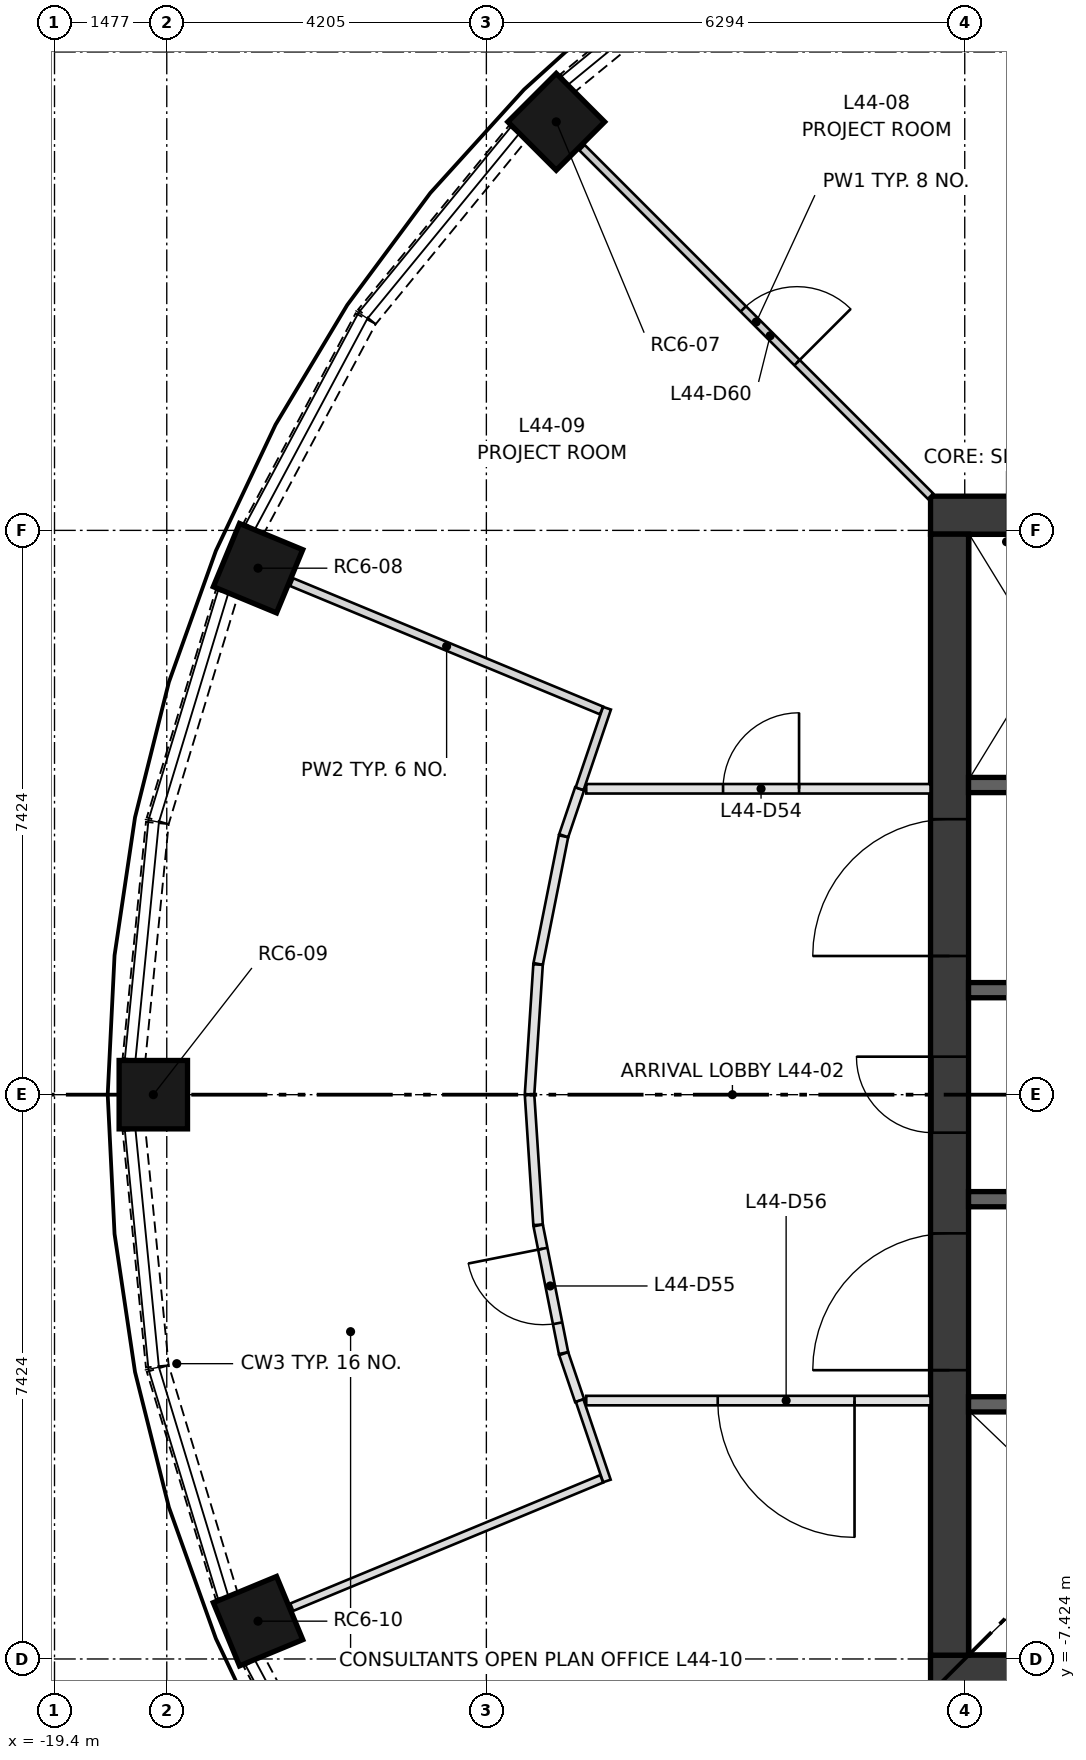
"""IFC4 building model, lengths in metres.
Left out: names, types, materials, properties, quantities, classifications, styles, units other than length and angle.
Written with IfcOpenShell. Run it as: python <this file> out.ifc"""

import sys

from ifc_helpers import new_model, si_unit, direction, frame, frame_2d, origin, origin_2d, place, context, subcontext, project, spatial, rectangle, extrude, element, fill, save


model = new_model("IFC4")
c1 = context("Model", 3, precision=1e-05, world=origin(), true_north=direction((0.0, 1.0)))
c2 = subcontext(c1, "Body", "Model", "MODEL_VIEW")
j1 = project(units=[si_unit("LENGTHUNIT", "METRE"), si_unit("PLANEANGLEUNIT", "RADIAN")], contexts=[c1])
p1 = place(None, origin())
s1 = spatial("IfcSite", under=j1, at=p1, CompositionType="ELEMENT")
p2 = place(p1, origin())
s2 = spatial("IfcBuilding", under=s1, at=p2, CompositionType="ELEMENT")
p3 = place(p2, frame((0.0, 0.0, 167.55)))
s3 = spatial("IfcBuildingStorey", under=s2, at=p3, CompositionType="ELEMENT", Elevation=167.55)
for number, where, z_axis, x_axis in (
    (1, (-12.799, 12.799, 0.0), (0.0, 0.0, 1.0), (-0.707, 0.707, 0.0)),
    (2, (-16.722, 6.927, 0.0), (0.0, 0.0, 1.0), (-0.924, 0.383, 0.0)),
    (3, (-18.1, 0.0, 0.0), (0.0, 0.0, 1.0), (-1.0, 0.0, 0.0)),
    (4, (-16.722, -6.927, 0.0), (0.0, 0.0, 1.0), (-0.924, -0.383, 0.0)),
):
    element("IfcColumn", number, at=place(p3, frame(where, z_axis=z_axis, x_axis=x_axis)), inside=s3, PredefinedType="COLUMN", context=c2, shape_type="SweptSolid", body=[
        extrude(rectangle(XDim=0.9, YDim=0.9, at=origin_2d()), origin(), (0.0, 0.0, 1.0), 3.35),
    ])
for number, where, z_axis, x_axis in (
    (5, (-7.874, -7.624, 0.0), (0.0, 0.0, 1.0), (1.0, 0.0, 0.0)),
    (6, (-7.874, 7.624, 0.0), (0.0, 0.0, 1.0), (1.0, 0.0, 0.0)),
):
    element("IfcWall", number, at=place(p3, frame(where, z_axis=z_axis, x_axis=x_axis)), inside=s3, PredefinedType="SHEAR", context=c2, shape_type="SweptSolid", body=[
        extrude(rectangle(XDim=15.748, YDim=0.5, at=frame_2d((7.874, 0.0))), origin(), (0.0, 0.0, 1.0), 3.35),
    ])
p4 = place(p3, frame((-7.624, -7.374, 0.0), z_axis=(0.0, 0.0, 1.0), x_axis=(0.0, 1.0, 0.0)))
e7 = element("IfcWall", 7, at=p4, inside=s3, PredefinedType="SHEAR", context=c2, shape_type="SweptSolid", body=[
    extrude(rectangle(XDim=14.748, YDim=0.5, at=frame_2d((7.374, 0.0))), origin(), (0.0, 0.0, 1.0), 3.35),
])
p5 = place(p4, frame((6.874, 0.0, 0.0)))
e8 = element("IfcOpeningElement", 8, at=p5, cuts=e7, PredefinedType="OPENING", context=c2, shape_type="SweptSolid", body=[
    extrude(rectangle(XDim=1.0, YDim=2.1, at=frame_2d((0.5, 1.05))), frame((0.0, 0.26, 0.0), z_axis=(0.0, -1.0, 0.0), x_axis=(1.0, 0.0, 0.0)), (0.0, 0.0, 1.0), 0.52),
])
p6 = place(p4, frame((3.75, 0.0, 0.0)))
e9 = element("IfcOpeningElement", 9, at=p6, cuts=e7, PredefinedType="OPENING", context=c2, shape_type="SweptSolid", body=[
    extrude(rectangle(XDim=1.8, YDim=2.1, at=frame_2d((0.9, 1.05))), frame((0.0, 0.26, 0.0), z_axis=(0.0, -1.0, 0.0), x_axis=(1.0, 0.0, 0.0)), (0.0, 0.0, 1.0), 0.52),
])
p7 = place(p4, frame((9.198, 0.0, 0.0)))
e10 = element("IfcOpeningElement", 10, at=p7, cuts=e7, PredefinedType="OPENING", context=c2, shape_type="SweptSolid", body=[
    extrude(rectangle(XDim=1.8, YDim=2.1, at=frame_2d((0.9, 1.05))), frame((0.0, 0.26, 0.0), z_axis=(0.0, -1.0, 0.0), x_axis=(1.0, 0.0, 0.0)), (0.0, 0.0, 1.0), 0.52),
])
p8 = place(p3, frame((-7.374, -4.074, 0.0), z_axis=(0.0, 0.0, 1.0), x_axis=(1.0, 0.0, 0.0)))
e11 = element("IfcWall", 11, at=p8, inside=s3, PredefinedType="SHEAR", context=c2, shape_type="SweptSolid", body=[
    extrude(rectangle(XDim=14.748, YDim=0.2, at=frame_2d((7.374, 0.0))), origin(), (0.0, 0.0, 1.0), 3.0),
])
p9 = place(p8, frame((1.319, 0.0, 0.0)))
e12 = element("IfcOpeningElement", 12, at=p9, cuts=e11, PredefinedType="OPENING", context=c2, shape_type="SweptSolid", body=[
    extrude(rectangle(XDim=1.1, YDim=2.1, at=frame_2d((0.55, 1.05))), frame((0.0, 0.11, 0.0), z_axis=(0.0, -1.0, 0.0), x_axis=(1.0, 0.0, 0.0)), (0.0, 0.0, 1.0), 0.22),
])
p10 = place(p8, frame((4.456, 0.0, 0.0)))
e13 = element("IfcOpeningElement", 13, at=p10, cuts=e11, PredefinedType="OPENING", context=c2, shape_type="SweptSolid", body=[
    extrude(rectangle(XDim=1.1, YDim=2.1, at=frame_2d((0.55, 1.05))), frame((0.0, 0.11, 0.0), z_axis=(0.0, -1.0, 0.0), x_axis=(1.0, 0.0, 0.0)), (0.0, 0.0, 1.0), 0.22),
])
p11 = place(p8, frame((7.551, 0.0, 0.0)))
e14 = element("IfcOpeningElement", 14, at=p11, cuts=e11, PredefinedType="OPENING", context=c2, shape_type="SweptSolid", body=[
    extrude(rectangle(XDim=1.0, YDim=2.1, at=frame_2d((0.5, 1.05))), frame((0.0, 0.11, 0.0), z_axis=(0.0, -1.0, 0.0), x_axis=(1.0, 0.0, 0.0)), (0.0, 0.0, 1.0), 0.22),
])
p12 = place(p8, frame((9.914, 0.0, 0.0)))
e15 = element("IfcOpeningElement", 15, at=p12, cuts=e11, PredefinedType="OPENING", context=c2, shape_type="SweptSolid", body=[
    extrude(rectangle(XDim=1.0, YDim=2.1, at=frame_2d((0.5, 1.05))), frame((0.0, 0.11, 0.0), z_axis=(0.0, -1.0, 0.0), x_axis=(1.0, 0.0, 0.0)), (0.0, 0.0, 1.0), 0.22),
])
p13 = place(p8, frame((11.688, 0.0, 0.0)))
e16 = element("IfcOpeningElement", 16, at=p13, cuts=e11, PredefinedType="OPENING", context=c2, shape_type="SweptSolid", body=[
    extrude(rectangle(XDim=1.0, YDim=2.1, at=frame_2d((0.5, 1.05))), frame((0.0, 0.11, 0.0), z_axis=(0.0, -1.0, 0.0), x_axis=(1.0, 0.0, 0.0)), (0.0, 0.0, 1.0), 0.22),
])
p14 = place(p8, frame((13.461, 0.0, 0.0)))
e17 = element("IfcOpeningElement", 17, at=p14, cuts=e11, PredefinedType="OPENING", context=c2, shape_type="SweptSolid", body=[
    extrude(rectangle(XDim=1.0, YDim=2.1, at=frame_2d((0.5, 1.05))), frame((0.0, 0.11, 0.0), z_axis=(0.0, -1.0, 0.0), x_axis=(1.0, 0.0, 0.0)), (0.0, 0.0, 1.0), 0.22),
])
p15 = place(p3, frame((-7.374, 4.074, 0.0), z_axis=(0.0, 0.0, 1.0), x_axis=(1.0, 0.0, 0.0)))
e18 = element("IfcWall", 18, at=p15, inside=s3, PredefinedType="SHEAR", context=c2, shape_type="SweptSolid", body=[
    extrude(rectangle(XDim=7.374, YDim=0.2, at=frame_2d((3.687, 0.0))), origin(), (0.0, 0.0, 1.0), 3.0),
])
p16 = place(p15, frame((0.684, 0.0, 0.0)))
e19 = element("IfcOpeningElement", 19, at=p16, cuts=e18, PredefinedType="OPENING", context=c2, shape_type="SweptSolid", body=[
    extrude(rectangle(XDim=1.0, YDim=2.1, at=frame_2d((0.5, 1.05))), frame((0.0, 0.11, 0.0), z_axis=(0.0, -1.0, 0.0), x_axis=(1.0, 0.0, 0.0)), (0.0, 0.0, 1.0), 0.22),
])
p17 = place(p15, frame((2.453, 0.0, 0.0)))
e20 = element("IfcOpeningElement", 20, at=p17, cuts=e18, PredefinedType="OPENING", context=c2, shape_type="SweptSolid", body=[
    extrude(rectangle(XDim=1.0, YDim=2.1, at=frame_2d((0.5, 1.05))), frame((0.0, 0.11, 0.0), z_axis=(0.0, -1.0, 0.0), x_axis=(1.0, 0.0, 0.0)), (0.0, 0.0, 1.0), 0.22),
])
p18 = place(p15, frame((4.221, 0.0, 0.0)))
e21 = element("IfcOpeningElement", 21, at=p18, cuts=e18, PredefinedType="OPENING", context=c2, shape_type="SweptSolid", body=[
    extrude(rectangle(XDim=1.0, YDim=2.1, at=frame_2d((0.5, 1.05))), frame((0.0, 0.11, 0.0), z_axis=(0.0, -1.0, 0.0), x_axis=(1.0, 0.0, 0.0)), (0.0, 0.0, 1.0), 0.22),
])
p19 = place(p15, frame((5.99, 0.0, 0.0)))
e22 = element("IfcOpeningElement", 22, at=p19, cuts=e18, PredefinedType="OPENING", context=c2, shape_type="SweptSolid", body=[
    extrude(rectangle(XDim=1.0, YDim=2.1, at=frame_2d((0.5, 1.05))), frame((0.0, 0.11, 0.0), z_axis=(0.0, -1.0, 0.0), x_axis=(1.0, 0.0, 0.0)), (0.0, 0.0, 1.0), 0.22),
])
for number, where, z_axis, x_axis in (
    (23, (-7.374, -1.375, 0.0), (0.0, 0.0, 1.0), (1.0, 0.0, 0.0)),
    (24, (-7.374, 1.375, 0.0), (0.0, 0.0, 1.0), (1.0, 0.0, 0.0)),
):
    element("IfcWall", number, at=place(p3, frame(where, z_axis=z_axis, x_axis=x_axis)), inside=s3, PredefinedType="SHEAR", context=c2, shape_type="SweptSolid", body=[
        extrude(rectangle(XDim=3.0, YDim=0.2, at=frame_2d((1.5, 0.0))), origin(), (0.0, 0.0, 1.0), 3.0),
    ])
for number, where, z_axis, x_axis in (
    (25, (-10.234, 15.29, 0.0), (0.0, 0.0, 1.0), (-0.773, -0.634, 0.0)),
    (26, (-13.306, 12.651, 0.0), (0.0, 0.0, 1.0), (-0.634, -0.773, 0.0)),
):
    element("IfcWall", number, at=place(p3, frame(where, z_axis=z_axis, x_axis=x_axis)), inside=s3, PredefinedType="SOLIDWALL", context=c2, shape_type="SweptSolid", body=[
        extrude(rectangle(XDim=3.127, YDim=0.3, at=frame_2d((1.563, 0.0))), origin(), (0.0, 0.0, 1.0), 0.9),
    ])
p20 = place(p3, frame((-15.306, 10.209, 0.0), z_axis=(0.0, 0.0, 1.0), x_axis=(-0.47120441036, -0.882024038027, 0.0)))
e27 = element("IfcWall", 27, at=p20, inside=s3, PredefinedType="SOLIDWALL", context=c2, shape_type="SweptSolid", body=[
    extrude(rectangle(XDim=3.125, YDim=0.3, at=frame_2d((1.562, 0.0))), origin(), (0.0, 0.0, 1.0), 0.9),
])
p21 = place(p3, frame((-17.135, 6.596, 0.0), z_axis=(0.0, 0.0, 1.0), x_axis=(-0.290083245834, -0.957001416136, 0.0)))
e28 = element("IfcWall", 28, at=p21, inside=s3, PredefinedType="SOLIDWALL", context=c2, shape_type="SweptSolid", body=[
    extrude(rectangle(XDim=3.127, YDim=0.3, at=frame_2d((1.563, 0.0))), origin(), (0.0, 0.0, 1.0), 0.9),
])
for number, where, z_axis, x_axis in (
    (29, (-18.048, 3.574, 0.0), (0.0, 0.0, 1.0), (-0.098, -0.995, 0.0)),
    (30, (-18.354, -0.464, 0.0), (0.0, 0.0, 1.0), (0.098, -0.995, 0.0)),
):
    element("IfcWall", number, at=place(p3, frame(where, z_axis=z_axis, x_axis=x_axis)), inside=s3, PredefinedType="SOLIDWALL", context=c2, shape_type="SweptSolid", body=[
        extrude(rectangle(XDim=3.125, YDim=0.3, at=frame_2d((1.563, 0.0))), origin(), (0.0, 0.0, 1.0), 0.9),
    ])
p22 = place(p3, frame((-18.042, -3.604, 0.0), z_axis=(0.0, 0.0, 1.0), x_axis=(0.290083245834, -0.957001416136, 0.0)))
e31 = element("IfcWall", 31, at=p22, inside=s3, PredefinedType="SOLIDWALL", context=c2, shape_type="SweptSolid", body=[
    extrude(rectangle(XDim=3.127, YDim=0.3, at=frame_2d((1.563, 0.0))), origin(), (0.0, 0.0, 1.0), 0.9),
])
p23 = place(p3, frame((-16.779, -7.452, 0.0), z_axis=(0.0, 0.0, 1.0), x_axis=(0.47120441036, -0.882024038027, 0.0)))
e32 = element("IfcWall", 32, at=p23, inside=s3, PredefinedType="SOLIDWALL", context=c2, shape_type="SweptSolid", body=[
    extrude(rectangle(XDim=3.125, YDim=0.3, at=frame_2d((1.562, 0.0))), origin(), (0.0, 0.0, 1.0), 0.9),
])
p24 = place(p3, frame((-12.404, 4.024, 0.0), z_axis=(0.0, 0.0, 1.0), x_axis=(1.0, 0.0, 0.0)))
e33 = element("IfcWall", 33, at=p24, inside=s3, PredefinedType="PARTITIONING", context=c2, shape_type="SweptSolid", body=[
    extrude(rectangle(XDim=4.53, YDim=0.125, at=frame_2d((2.265, 0.0))), origin(), (0.0, 0.0, 1.0), 3.0),
])
p25 = place(p24, frame((1.8, 0.0, 0.0)))
e34 = element("IfcOpeningElement", 34, at=p25, cuts=e33, PredefinedType="OPENING", context=c2, shape_type="SweptSolid", body=[
    extrude(rectangle(XDim=1.0, YDim=2.1, at=frame_2d((0.5, 1.05))), frame((0.0, 0.073, 0.0), z_axis=(0.0, -1.0, 0.0), x_axis=(1.0, 0.0, 0.0)), (0.0, 0.0, 1.0), 0.145),
])
for number, where, z_axis, x_axis in (
    (35, (-13.15, 0.004, 0.0), (0.0, 0.0, 1.0), (0.065, 0.998, 0.0)),
    (36, (-13.038, -1.712, 0.0), (0.0, 0.0, 1.0), (-0.065, 0.998, 0.0)),
    (37, (-13.037, 1.72, 0.0), (0.0, 0.0, 1.0), (0.195, 0.981, 0.0)),
):
    element("IfcWall", number, at=place(p3, frame(where, z_axis=z_axis, x_axis=x_axis)), inside=s3, PredefinedType="PARTITIONING", context=c2, shape_type="SweptSolid", body=[
        extrude(rectangle(XDim=1.712, YDim=0.125, at=frame_2d((0.856, 0.0))), origin(), (0.0, 0.0, 1.0), 3.0),
    ])
p26 = place(p3, frame((-12.703, -3.399, 0.0), z_axis=(0.0, 0.0, 1.0), x_axis=(-0.195101249107, 0.980783106806, 0.0)))
e38 = element("IfcWall", 38, at=p26, inside=s3, PredefinedType="PARTITIONING", context=c2, shape_type="SweptSolid", body=[
    extrude(rectangle(XDim=1.712, YDim=0.125, at=frame_2d((0.856, 0.0))), origin(), (0.0, 0.0, 1.0), 3.0),
])
p27 = place(p26, frame((0.4, 0.0, 0.0)))
e39 = element("IfcOpeningElement", 39, at=p27, cuts=e38, PredefinedType="OPENING", context=c2, shape_type="SweptSolid", body=[
    extrude(rectangle(XDim=1.0, YDim=2.1, at=frame_2d((0.5, 1.05))), frame((0.0, 0.073, 0.0), z_axis=(0.0, -1.0, 0.0), x_axis=(1.0, 0.0, 0.0)), (0.0, 0.0, 1.0), 0.145),
])
for number, where, z_axis, x_axis in (
    (40, (-12.701, 3.407, 0.0), (0.0, 0.0, 1.0), (0.322, 0.947, 0.0)),
    (41, (-12.491, -4.024, 0.0), (0.0, 0.0, 1.0), (-0.322, 0.947, 0.0)),
):
    element("IfcWall", number, at=place(p3, frame(where, z_axis=z_axis, x_axis=x_axis)), inside=s3, PredefinedType="PARTITIONING", context=c2, shape_type="SweptSolid", body=[
        extrude(rectangle(XDim=0.652, YDim=0.125, at=frame_2d((0.326, 0.0))), origin(), (0.0, 0.0, 1.0), 3.0),
    ])
p28 = place(p3, frame((-7.874, -4.024, 0.0), z_axis=(0.0, 0.0, 1.0), x_axis=(-1.0, 0.0, 0.0)))
e42 = element("IfcWall", 42, at=p28, inside=s3, PredefinedType="PARTITIONING", context=c2, shape_type="SweptSolid", body=[
    extrude(rectangle(XDim=4.53, YDim=0.125, at=frame_2d((2.265, 0.0))), origin(), (0.0, 0.0, 1.0), 3.0),
])
p29 = place(p28, frame((1.0, 0.0, 0.0)))
e43 = element("IfcOpeningElement", 43, at=p29, cuts=e42, PredefinedType="OPENING", context=c2, shape_type="SweptSolid", body=[
    extrude(rectangle(XDim=1.8, YDim=2.1, at=frame_2d((0.9, 1.05))), frame((0.0, 0.073, 0.0), z_axis=(0.0, -1.0, 0.0), x_axis=(1.0, 0.0, 0.0)), (0.0, 0.0, 1.0), 0.145),
])
p30 = place(p3, frame((-12.459, 12.459, 0.0), z_axis=(0.0, 0.0, 1.0), x_axis=(0.707106781187, -0.707106781187, 0.0)))
e44 = element("IfcWall", 44, at=p30, inside=s3, PredefinedType="PARTITIONING", context=c2, shape_type="SweptSolid", body=[
    extrude(rectangle(XDim=6.484, YDim=0.1, at=frame_2d((3.242, 0.0))), origin(), (0.0, 0.0, 1.0), 3.0),
])
p31 = place(p30, frame((3.0, 0.0, 0.0)))
e45 = element("IfcOpeningElement", 45, at=p31, cuts=e44, PredefinedType="OPENING", context=c2, shape_type="SweptSolid", body=[
    extrude(rectangle(XDim=1.0, YDim=2.1, at=frame_2d((0.5, 1.05))), frame((0.0, 0.06, 0.0), z_axis=(0.0, -1.0, 0.0), x_axis=(1.0, 0.0, 0.0)), (0.0, 0.0, 1.0), 0.12),
])
p32 = place(p3, frame((-12.491, 4.024, 0.0), z_axis=(0.0, 0.0, 1.0), x_axis=(0.321456988234, 0.946924181081, 0.0)))
e46 = element("IfcWall", 46, at=p32, inside=s3, PredefinedType="PARTITIONING", context=c2, shape_type="SweptSolid", body=[
    extrude(rectangle(XDim=1.119, YDim=0.11, at=frame_2d((0.56, 0.0))), origin(), (0.0, 0.0, 1.0), 3.0),
])
p33 = place(p3, frame((-12.203, 5.055, 0.0), z_axis=(0.0, 0.0, 1.0), x_axis=(-0.923869102729, 0.382708611117, 0.0)))
e47 = element("IfcWall", 47, at=p33, inside=s3, PredefinedType="PARTITIONING", context=c2, shape_type="SweptSolid", body=[
    extrude(rectangle(XDim=4.411, YDim=0.11, at=frame_2d((2.206, 0.0))), origin(), (0.0, 0.0, 1.0), 3.0),
])
p34 = place(p3, frame((-12.491, -4.024, 0.0), z_axis=(0.0, 0.0, 1.0), x_axis=(0.321534356008, -0.946897913139, 0.0)))
e48 = element("IfcWall", 48, at=p34, inside=s3, PredefinedType="PARTITIONING", context=c2, shape_type="SweptSolid", body=[
    extrude(rectangle(XDim=1.117, YDim=0.105, at=frame_2d((0.559, 0.0))), origin(), (0.0, 0.0, 1.0), 3.0),
])
p35 = place(p3, frame((-12.201, -5.054, 0.0), z_axis=(0.0, 0.0, 1.0), x_axis=(-0.923879989031, -0.382682330227, 0.0)))
e49 = element("IfcWall", 49, at=p35, inside=s3, PredefinedType="PARTITIONING", context=c2, shape_type="SweptSolid", body=[
    extrude(rectangle(XDim=4.414, YDim=0.105, at=frame_2d((2.207, 0.0))), origin(), (0.0, 0.0, 1.0), 3.0),
])
p36 = place(p5, origin())
e50 = element("IfcDoor", 50, at=p36, inside=s3, OperationType="SINGLE_SWING_RIGHT", PredefinedType="DOOR", context=c2, shape_type="SweptSolid", body=[
    extrude(rectangle(XDim=1.0, YDim=2.1, at=frame_2d((0.5, 1.05))), frame((0.0, 0.25, 0.0), z_axis=(0.0, -1.0, 0.0), x_axis=(1.0, 0.0, 0.0)), (0.0, 0.0, 1.0), 0.05),
])
fill(e8, e50)
p37 = place(p6, origin())
e51 = element("IfcDoor", 51, at=p37, inside=s3, OperationType="DOUBLE_DOOR_SINGLE_SWING", PredefinedType="DOOR", context=c2, shape_type="SweptSolid", body=[
    extrude(rectangle(XDim=1.8, YDim=2.1, at=frame_2d((0.9, 1.05))), frame((0.0, 0.025, 0.0), z_axis=(0.0, -1.0, 0.0), x_axis=(1.0, 0.0, 0.0)), (0.0, 0.0, 1.0), 0.05),
])
fill(e9, e51)
p38 = place(p7, origin())
e52 = element("IfcDoor", 52, at=p38, inside=s3, OperationType="DOUBLE_DOOR_SINGLE_SWING", PredefinedType="DOOR", context=c2, shape_type="SweptSolid", body=[
    extrude(rectangle(XDim=1.8, YDim=2.1, at=frame_2d((0.9, 1.05))), frame((0.0, 0.025, 0.0), z_axis=(0.0, -1.0, 0.0), x_axis=(1.0, 0.0, 0.0)), (0.0, 0.0, 1.0), 0.05),
])
fill(e10, e52)
p39 = place(p25, origin())
e53 = element("IfcDoor", 53, at=p39, inside=s3, OperationType="SINGLE_SWING_RIGHT", PredefinedType="DOOR", context=c2, shape_type="SweptSolid", body=[
    extrude(rectangle(XDim=1.0, YDim=2.1, at=frame_2d((0.5, 1.05))), frame((0.0, 0.025, 0.0), z_axis=(0.0, -1.0, 0.0), x_axis=(1.0, 0.0, 0.0)), (0.0, 0.0, 1.0), 0.05),
])
fill(e34, e53)
p40 = place(p27, origin())
e54 = element("IfcDoor", 54, at=p40, inside=s3, OperationType="SINGLE_SWING_RIGHT", PredefinedType="DOOR", context=c2, shape_type="SweptSolid", body=[
    extrude(rectangle(XDim=1.0, YDim=2.1, at=frame_2d((0.5, 1.05))), frame((0.0, 0.025, 0.0), z_axis=(0.0, -1.0, 0.0), x_axis=(1.0, 0.0, 0.0)), (0.0, 0.0, 1.0), 0.05),
])
fill(e39, e54)
p41 = place(p29, origin())
e55 = element("IfcDoor", 55, at=p41, inside=s3, OperationType="DOUBLE_DOOR_SINGLE_SWING", PredefinedType="DOOR", context=c2, shape_type="SweptSolid", body=[
    extrude(rectangle(XDim=1.8, YDim=2.1, at=frame_2d((0.9, 1.05))), frame((0.0, 0.025, 0.0), z_axis=(0.0, -1.0, 0.0), x_axis=(1.0, 0.0, 0.0)), (0.0, 0.0, 1.0), 0.05),
])
fill(e43, e55)
p42 = place(p31, origin())
e56 = element("IfcDoor", 56, at=p42, inside=s3, OperationType="SINGLE_SWING_RIGHT", PredefinedType="DOOR", context=c2, shape_type="SweptSolid", body=[
    extrude(rectangle(XDim=1.0, YDim=2.1, at=frame_2d((0.5, 1.05))), frame((0.0, 0.025, 0.0), z_axis=(0.0, -1.0, 0.0), x_axis=(1.0, 0.0, 0.0)), (0.0, 0.0, 1.0), 0.05),
])
fill(e45, e56)
save(model, sys.argv[1])
